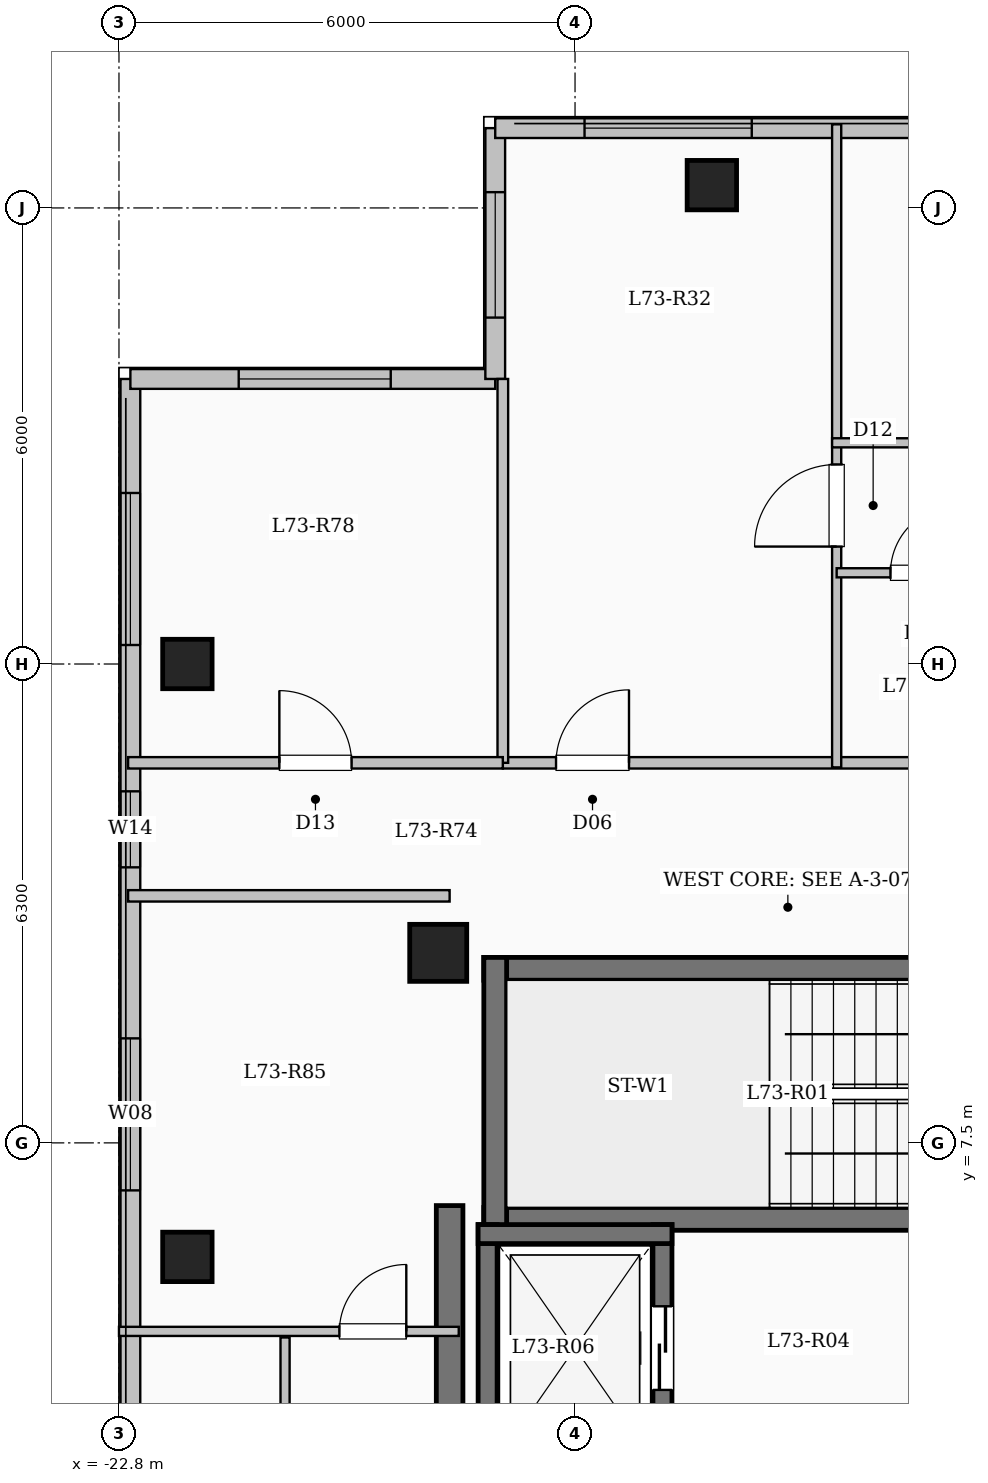
"""IFC4 building model, lengths in metres.
Left out: names, types, materials, properties, quantities, classifications, styles, units other than length and angle.
Written with IfcOpenShell. Run it as: python <this file> out.ifc"""

import sys

from ifc_helpers import new_model, si_unit, direction, frame, frame_2d, origin, origin_2d, place, context, subcontext, project, spatial, rectangle, extrude, element, fill, save


model = new_model("IFC4")
c1 = context("Model", 3, precision=1e-05, world=origin(), true_north=direction((0.0, 1.0)))
c2 = subcontext(c1, "Body", "Model", "MODEL_VIEW")
j1 = project(units=[si_unit("LENGTHUNIT", "METRE"), si_unit("PLANEANGLEUNIT", "RADIAN")], contexts=[c1])
p1 = place(None, origin())
s1 = spatial("IfcSite", under=j1, at=p1, CompositionType="ELEMENT")
p2 = place(p1, origin())
s2 = spatial("IfcBuilding", under=s1, at=p2, CompositionType="ELEMENT")
p3 = place(p2, frame((0.0, 0.0, 268.3)))
s3 = spatial("IfcBuildingStorey", under=s2, at=p3, CompositionType="ELEMENT", Elevation=268.3)
p4 = place(p3, frame((-18.6, 10.0, 0.0), z_axis=(0.0, 0.0, 1.0), x_axis=(1.0, 0.0, 0.0)))
e1 = element("IfcColumn", 1, at=p4, inside=s3, PredefinedType="COLUMN", context=c2, shape_type="SweptSolid", body=[
    extrude(rectangle(XDim=0.75, YDim=0.75, at=origin_2d()), origin(), (0.0, 0.0, 1.0), 3.35),
])
for number, where, z_axis, x_axis in (
    (2, (-15.0, 20.1, 0.0), (0.0, 0.0, 1.0), (1.0, 0.0, 0.0)),
    (3, (-21.9, 6.0, 0.0), (0.0, 0.0, 1.0), (1.0, 0.0, 0.0)),
    (4, (-21.9, 13.8, 0.0), (0.0, 0.0, 1.0), (1.0, 0.0, 0.0)),
):
    element("IfcColumn", number, at=place(p3, frame(where, z_axis=z_axis, x_axis=x_axis)), inside=s3, PredefinedType="COLUMN", context=c2, shape_type="SweptSolid", body=[
        extrude(rectangle(XDim=0.65, YDim=0.65, at=origin_2d()), origin(), (0.0, 0.0, 1.0), 3.35),
    ])
p5 = place(p3, frame((-22.65, -17.55, 0.0), z_axis=(0.0, 0.0, 1.0), x_axis=(0.0, 1.0, 0.0)))
e5 = element("IfcWall", 5, at=p5, inside=s3, PredefinedType="SOLIDWALL", context=c2, shape_type="SweptSolid", body=[
    extrude(rectangle(XDim=35.1, YDim=0.26, at=frame_2d((17.55, 0.0))), origin(), (0.0, 0.0, 1.0), 3.05),
])
p6 = place(p5, frame((2.975, 0.0, 0.9)))
e6 = element("IfcOpeningElement", 6, at=p6, cuts=e5, PredefinedType="OPENING", context=c2, shape_type="SweptSolid", body=[
    extrude(rectangle(XDim=2.2, YDim=1.75, at=frame_2d((1.1, 0.875))), frame((0.0, 0.14, 0.0), z_axis=(0.0, -1.0, 0.0), x_axis=(1.0, 0.0, 0.0)), (0.0, 0.0, 1.0), 0.28),
])
p7 = place(p5, frame((8.625, 0.0, 0.95)))
e7 = element("IfcOpeningElement", 7, at=p7, cuts=e5, PredefinedType="OPENING", context=c2, shape_type="SweptSolid", body=[
    extrude(rectangle(XDim=1.2, YDim=1.5, at=frame_2d((0.6, 0.75))), frame((0.0, 0.14, 0.0), z_axis=(0.0, -1.0, 0.0), x_axis=(1.0, 0.0, 0.0)), (0.0, 0.0, 1.0), 0.28),
])
p8 = place(p5, frame((13.55, 0.0, 0.9)))
e8 = element("IfcOpeningElement", 8, at=p8, cuts=e5, PredefinedType="OPENING", context=c2, shape_type="SweptSolid", body=[
    extrude(rectangle(XDim=2.2, YDim=1.75, at=frame_2d((1.1, 0.875))), frame((0.0, 0.14, 0.0), z_axis=(0.0, -1.0, 0.0), x_axis=(1.0, 0.0, 0.0)), (0.0, 0.0, 1.0), 0.28),
])
p9 = place(p5, frame((19.95, 0.0, 0.9)))
e9 = element("IfcOpeningElement", 9, at=p9, cuts=e5, PredefinedType="OPENING", context=c2, shape_type="SweptSolid", body=[
    extrude(rectangle(XDim=1.65, YDim=1.6, at=frame_2d((0.825, 0.8))), frame((0.0, 0.14, 0.0), z_axis=(0.0, -1.0, 0.0), x_axis=(1.0, 0.0, 0.0)), (0.0, 0.0, 1.0), 0.28),
])
p10 = place(p5, frame((24.425, 0.0, 0.9)))
e10 = element("IfcOpeningElement", 10, at=p10, cuts=e5, PredefinedType="OPENING", context=c2, shape_type="SweptSolid", body=[
    extrude(rectangle(XDim=2.0, YDim=1.7, at=frame_2d((1.0, 0.85))), frame((0.0, 0.14, 0.0), z_axis=(0.0, -1.0, 0.0), x_axis=(1.0, 0.0, 0.0)), (0.0, 0.0, 1.0), 0.28),
])
p11 = place(p5, frame((28.675, 0.0, 0.95)))
e11 = element("IfcOpeningElement", 11, at=p11, cuts=e5, PredefinedType="OPENING", context=c2, shape_type="SweptSolid", body=[
    extrude(rectangle(XDim=1.0, YDim=1.5, at=frame_2d((0.5, 0.75))), frame((0.0, 0.14, 0.0), z_axis=(0.0, -1.0, 0.0), x_axis=(1.0, 0.0, 0.0)), (0.0, 0.0, 1.0), 0.28),
])
p12 = place(p5, frame((31.6, 0.0, 0.9)))
e12 = element("IfcOpeningElement", 12, at=p12, cuts=e5, PredefinedType="OPENING", context=c2, shape_type="SweptSolid", body=[
    extrude(rectangle(XDim=2.0, YDim=1.7, at=frame_2d((1.0, 0.85))), frame((0.0, 0.14, 0.0), z_axis=(0.0, -1.0, 0.0), x_axis=(1.0, 0.0, 0.0)), (0.0, 0.0, 1.0), 0.28),
])
p13 = place(p3, frame((-22.65, 17.55, 0.0), z_axis=(0.0, 0.0, 1.0), x_axis=(1.0, 0.0, 0.0)))
e13 = element("IfcWall", 13, at=p13, inside=s3, PredefinedType="SOLIDWALL", context=c2, shape_type="SweptSolid", body=[
    extrude(rectangle(XDim=4.8, YDim=0.26, at=frame_2d((2.4, 0.0))), origin(), (0.0, 0.0, 1.0), 3.05),
])
p14 = place(p13, frame((1.425, 0.0, 0.9)))
e14 = element("IfcOpeningElement", 14, at=p14, cuts=e13, PredefinedType="OPENING", context=c2, shape_type="SweptSolid", body=[
    extrude(rectangle(XDim=2.0, YDim=1.7, at=frame_2d((1.0, 0.85))), frame((0.0, 0.14, 0.0), z_axis=(0.0, -1.0, 0.0), x_axis=(1.0, 0.0, 0.0)), (0.0, 0.0, 1.0), 0.28),
])
p15 = place(p3, frame((-17.85, 17.55, 0.0), z_axis=(0.0, 0.0, 1.0), x_axis=(0.0, 1.0, 0.0)))
e15 = element("IfcWall", 15, at=p15, inside=s3, PredefinedType="SOLIDWALL", context=c2, shape_type="SweptSolid", body=[
    extrude(rectangle(XDim=3.3, YDim=0.26, at=frame_2d((1.65, 0.0))), origin(), (0.0, 0.0, 1.0), 3.05),
])
p16 = place(p15, frame((0.808, 0.0, 0.9)))
e16 = element("IfcOpeningElement", 16, at=p16, cuts=e15, PredefinedType="OPENING", context=c2, shape_type="SweptSolid", body=[
    extrude(rectangle(XDim=1.65, YDim=1.6, at=frame_2d((0.825, 0.8))), frame((0.0, 0.14, 0.0), z_axis=(0.0, -1.0, 0.0), x_axis=(1.0, 0.0, 0.0)), (0.0, 0.0, 1.0), 0.28),
])
p17 = place(p3, frame((-17.85, 20.85, 0.0), z_axis=(0.0, 0.0, 1.0), x_axis=(1.0, 0.0, 0.0)))
e17 = element("IfcWall", 17, at=p17, inside=s3, PredefinedType="SOLIDWALL", context=c2, shape_type="SweptSolid", body=[
    extrude(rectangle(XDim=10.5, YDim=0.26, at=frame_2d((5.25, 0.0))), origin(), (0.0, 0.0, 1.0), 3.05),
])
p18 = place(p17, frame((1.175, 0.0, 0.9)))
e18 = element("IfcOpeningElement", 18, at=p18, cuts=e17, PredefinedType="OPENING", context=c2, shape_type="SweptSolid", body=[
    extrude(rectangle(XDim=2.2, YDim=1.75, at=frame_2d((1.1, 0.875))), frame((0.0, 0.14, 0.0), z_axis=(0.0, -1.0, 0.0), x_axis=(1.0, 0.0, 0.0)), (0.0, 0.0, 1.0), 0.28),
])
p19 = place(p17, frame((5.85, 0.0, 0.9)))
e19 = element("IfcOpeningElement", 19, at=p19, cuts=e17, PredefinedType="OPENING", context=c2, shape_type="SweptSolid", body=[
    extrude(rectangle(XDim=1.65, YDim=1.6, at=frame_2d((0.825, 0.8))), frame((0.0, 0.14, 0.0), z_axis=(0.0, -1.0, 0.0), x_axis=(1.0, 0.0, 0.0)), (0.0, 0.0, 1.0), 0.28),
])
p20 = place(p17, frame((9.292, 0.0, 0.95)))
e20 = element("IfcOpeningElement", 20, at=p20, cuts=e17, PredefinedType="OPENING", context=c2, shape_type="SweptSolid", body=[
    extrude(rectangle(XDim=1.0, YDim=1.5, at=frame_2d((0.5, 0.75))), frame((0.0, 0.14, 0.0), z_axis=(0.0, -1.0, 0.0), x_axis=(1.0, 0.0, 0.0)), (0.0, 0.0, 1.0), 0.28),
])
p21 = place(p3, frame((-18.0, 9.79, 0.0), z_axis=(0.0, 0.0, 1.0), x_axis=(1.0, 0.0, 0.0)))
e21 = element("IfcWall", 21, at=p21, inside=s3, PredefinedType="SHEAR", context=c2, shape_type="SweptSolid", body=[
    extrude(rectangle(XDim=8.0, YDim=0.3, at=frame_2d((4.0, 0.0))), origin(), (0.0, 0.0, 1.0), 3.35),
])
p22 = place(p3, frame((-18.0, 6.5, 0.0), z_axis=(0.0, 0.0, 1.0), x_axis=(1.0, 0.0, 0.0)))
e22 = element("IfcWall", 22, at=p22, inside=s3, PredefinedType="SHEAR", context=c2, shape_type="SweptSolid", body=[
    extrude(rectangle(XDim=8.0, YDim=0.3, at=frame_2d((4.0, 0.0))), origin(), (0.0, 0.0, 1.0), 3.35),
])
p23 = place(p22, frame((6.45, 0.0, 0.0)))
e23 = element("IfcOpeningElement", 23, at=p23, cuts=e22, PredefinedType="OPENING", context=c2, shape_type="SweptSolid", body=[
    extrude(rectangle(XDim=1.0, YDim=2.15, at=frame_2d((0.5, 1.075))), frame((0.0, 0.16, 0.0), z_axis=(0.0, -1.0, 0.0), x_axis=(1.0, 0.0, 0.0)), (0.0, 0.0, 1.0), 0.32),
])
p24 = place(p3, frame((-17.85, 6.35, 0.0), z_axis=(0.0, 0.0, 1.0), x_axis=(0.0, 1.0, 0.0)))
e24 = element("IfcWall", 24, at=p24, inside=s3, PredefinedType="SHEAR", context=c2, shape_type="SweptSolid", body=[
    extrude(rectangle(XDim=3.59, YDim=0.3, at=frame_2d((1.795, 0.0))), origin(), (0.0, 0.0, 1.0), 3.35),
])
p25 = place(p3, frame((-17.95, 3.175, 0.0), z_axis=(0.0, 0.0, 1.0), x_axis=(0.0, 1.0, 0.0)))
e25 = element("IfcWall", 25, at=p25, inside=s3, PredefinedType="SHEAR", context=c2, shape_type="SweptSolid", body=[
    extrude(rectangle(XDim=3.25, YDim=0.25, at=frame_2d((1.625, 0.0))), origin(), (0.0, 0.0, 1.0), 3.35),
])
p26 = place(p3, frame((-15.65, 3.175, 0.0), z_axis=(0.0, 0.0, 1.0), x_axis=(0.0, 1.0, 0.0)))
e26 = element("IfcWall", 26, at=p26, inside=s3, PredefinedType="SHEAR", context=c2, shape_type="SweptSolid", body=[
    extrude(rectangle(XDim=3.25, YDim=0.25, at=frame_2d((1.625, 0.0))), origin(), (0.0, 0.0, 1.0), 3.35),
])
p27 = place(p26, frame((1.075, 0.0, 0.0)))
e27 = element("IfcOpeningElement", 27, at=p27, cuts=e26, PredefinedType="OPENING", context=c2, shape_type="SweptSolid", body=[
    extrude(rectangle(XDim=1.1, YDim=2.15, at=frame_2d((0.55, 1.075))), frame((0.0, 0.135, 0.0), z_axis=(0.0, -1.0, 0.0), x_axis=(1.0, 0.0, 0.0)), (0.0, 0.0, 1.0), 0.27),
])
p28 = place(p3, frame((-18.075, 6.3, 0.0), z_axis=(0.0, 0.0, 1.0), x_axis=(1.0, 0.0, 0.0)))
e28 = element("IfcWall", 28, at=p28, inside=s3, PredefinedType="SHEAR", context=c2, shape_type="SweptSolid", body=[
    extrude(rectangle(XDim=2.55, YDim=0.25, at=frame_2d((1.275, 0.0))), origin(), (0.0, 0.0, 1.0), 3.35),
])
p29 = place(p3, frame((-18.45, -7.375, 0.0), z_axis=(0.0, 0.0, 1.0), x_axis=(0.0, 1.0, 0.0)))
e29 = element("IfcWall", 29, at=p29, inside=s3, PredefinedType="SHEAR", context=c2, shape_type="SweptSolid", body=[
    extrude(rectangle(XDim=14.05, YDim=0.35, at=frame_2d((7.025, 0.0))), origin(), (0.0, 0.0, 1.0), 3.35),
])
p30 = place(p3, frame((-17.75, 12.5, 0.0), z_axis=(0.0, 0.0, 1.0), x_axis=(1.0, 0.0, 0.0)))
e30 = element("IfcWall", 30, at=p30, inside=s3, PredefinedType="PARTITIONING", context=c2, shape_type="SweptSolid", body=[
    extrude(rectangle(XDim=13.9, YDim=0.15, at=frame_2d((6.95, 0.0))), origin(), (0.0, 0.0, 1.0), 3.05),
])
p31 = place(p30, frame((0.7, 0.0, 0.0)))
e31 = element("IfcOpeningElement", 31, at=p31, cuts=e30, PredefinedType="OPENING", context=c2, shape_type="SweptSolid", body=[
    extrude(rectangle(XDim=0.96, YDim=2.15, at=frame_2d((0.48, 1.075))), frame((0.0, 0.085, 0.0), z_axis=(0.0, -1.0, 0.0), x_axis=(1.0, 0.0, 0.0)), (0.0, 0.0, 1.0), 0.17),
])
p32 = place(p30, frame((9.484, 0.0, 0.0)))
e32 = element("IfcOpeningElement", 32, at=p32, cuts=e30, PredefinedType="OPENING", context=c2, shape_type="SweptSolid", body=[
    extrude(rectangle(XDim=0.96, YDim=2.15, at=frame_2d((0.48, 1.075))), frame((0.0, 0.085, 0.0), z_axis=(0.0, -1.0, 0.0), x_axis=(1.0, 0.0, 0.0)), (0.0, 0.0, 1.0), 0.17),
])
p33 = place(p3, frame((-13.358, 12.44, 0.0), z_axis=(0.0, 0.0, 1.0), x_axis=(0.0, 1.0, 0.0)))
e33 = element("IfcWall", 33, at=p33, inside=s3, PredefinedType="PARTITIONING", context=c2, shape_type="SweptSolid", body=[
    extrude(rectangle(XDim=8.46, YDim=0.12, at=frame_2d((4.23, 0.0))), origin(), (0.0, 0.0, 1.0), 3.05),
])
p34 = place(p33, frame((2.905, 0.0, 0.0)))
e34 = element("IfcOpeningElement", 34, at=p34, cuts=e33, PredefinedType="OPENING", context=c2, shape_type="SweptSolid", body=[
    extrude(rectangle(XDim=1.08, YDim=2.15, at=frame_2d((0.54, 1.075))), frame((0.0, 0.07, 0.0), z_axis=(0.0, -1.0, 0.0), x_axis=(1.0, 0.0, 0.0)), (0.0, 0.0, 1.0), 0.14),
])
p35 = place(p3, frame((-13.358, 15.0, 0.0), z_axis=(0.0, 0.0, 1.0), x_axis=(1.0, 0.0, 0.0)))
e35 = element("IfcWall", 35, at=p35, inside=s3, PredefinedType="PARTITIONING", context=c2, shape_type="SweptSolid", body=[
    extrude(rectangle(XDim=2.296, YDim=0.12, at=frame_2d((1.148, 0.0))), origin(), (0.0, 0.0, 1.0), 3.05),
])
p36 = place(p35, frame((0.708, 0.0, 0.0)))
e36 = element("IfcOpeningElement", 36, at=p36, cuts=e35, PredefinedType="OPENING", context=c2, shape_type="SweptSolid", body=[
    extrude(rectangle(XDim=0.88, YDim=2.1, at=frame_2d((0.44, 1.05))), frame((0.0, 0.07, 0.0), z_axis=(0.0, -1.0, 0.0), x_axis=(1.0, 0.0, 0.0)), (0.0, 0.0, 1.0), 0.14),
])
p37 = place(p3, frame((-13.418, 16.71, 0.0), z_axis=(0.0, 0.0, 1.0), x_axis=(1.0, 0.0, 0.0)))
e37 = element("IfcWall", 37, at=p37, inside=s3, PredefinedType="PARTITIONING", context=c2, shape_type="SweptSolid", body=[
    extrude(rectangle(XDim=4.512, YDim=0.12, at=frame_2d((2.256, 0.0))), origin(), (0.0, 0.0, 1.0), 2.735),
])
p38 = place(p37, frame((1.726, 0.0, 0.0)))
e38 = element("IfcOpeningElement", 38, at=p38, cuts=e37, PredefinedType="OPENING", context=c2, shape_type="SweptSolid", body=[
    extrude(rectangle(XDim=0.88, YDim=2.1, at=frame_2d((0.44, 1.05))), frame((0.0, 0.07, 0.0), z_axis=(0.0, -1.0, 0.0), x_axis=(1.0, 0.0, 0.0)), (0.0, 0.0, 1.0), 0.14),
])
p39 = place(p3, frame((-22.68, 10.75, 0.0), z_axis=(0.0, 0.0, 1.0), x_axis=(1.0, 0.0, 0.0)))
e39 = element("IfcWall", 39, at=p39, inside=s3, PredefinedType="PARTITIONING", context=c2, shape_type="SweptSolid", body=[
    extrude(rectangle(XDim=4.23, YDim=0.15, at=frame_2d((2.115, 0.0))), origin(), (0.0, 0.0, 1.0), 3.05),
])
p40 = place(p3, frame((-17.75, 12.5, 0.0), z_axis=(0.0, 0.0, 1.0), x_axis=(0.0, 1.0, 0.0)))
e40 = element("IfcWall", 40, at=p40, inside=s3, PredefinedType="PARTITIONING", context=c2, shape_type="SweptSolid", body=[
    extrude(rectangle(XDim=5.05, YDim=0.14, at=frame_2d((2.525, 0.0))), origin(), (0.0, 0.0, 1.0), 3.05),
])
p41 = place(p3, frame((-22.68, 12.5, 0.0), z_axis=(0.0, 0.0, 1.0), x_axis=(1.0, 0.0, 0.0)))
e41 = element("IfcWall", 41, at=p41, inside=s3, PredefinedType="PARTITIONING", context=c2, shape_type="SweptSolid", body=[
    extrude(rectangle(XDim=4.93, YDim=0.15, at=frame_2d((2.465, 0.0))), origin(), (0.0, 0.0, 1.0), 3.05),
])
p42 = place(p41, frame((1.99, 0.0, 0.0)))
e42 = element("IfcOpeningElement", 42, at=p42, cuts=e41, PredefinedType="OPENING", context=c2, shape_type="SweptSolid", body=[
    extrude(rectangle(XDim=0.95, YDim=2.15, at=frame_2d((0.475, 1.075))), frame((0.0, 0.085, 0.0), z_axis=(0.0, -1.0, 0.0), x_axis=(1.0, 0.0, 0.0)), (0.0, 0.0, 1.0), 0.17),
])
p43 = place(p3, frame((-22.8, 5.02, 0.0), z_axis=(0.0, 0.0, 1.0), x_axis=(1.0, 0.0, 0.0)))
e43 = element("IfcWall", 43, at=p43, inside=s3, PredefinedType="PARTITIONING", context=c2, shape_type="SweptSolid", body=[
    extrude(rectangle(XDim=4.47, YDim=0.12, at=frame_2d((2.235, 0.0))), origin(), (0.0, 0.0, 1.0), 3.05),
])
p44 = place(p43, frame((2.9, 0.0, 0.0)))
e44 = element("IfcOpeningElement", 44, at=p44, cuts=e43, PredefinedType="OPENING", context=c2, shape_type="SweptSolid", body=[
    extrude(rectangle(XDim=0.88, YDim=2.1, at=frame_2d((0.44, 1.05))), frame((0.0, 0.07, 0.0), z_axis=(0.0, -1.0, 0.0), x_axis=(1.0, 0.0, 0.0)), (0.0, 0.0, 1.0), 0.14),
])
p45 = place(p3, frame((-20.615, 1.36, 0.0), z_axis=(0.0, 0.0, 1.0), x_axis=(0.0, 1.0, 0.0)))
e45 = element("IfcWall", 45, at=p45, inside=s3, PredefinedType="PARTITIONING", context=c2, shape_type="SweptSolid", body=[
    extrude(rectangle(XDim=3.58, YDim=0.12, at=frame_2d((1.79, 0.0))), origin(), (0.0, 0.0, 1.0), 3.05),
])
p46 = place(p10, origin())
e46 = element("IfcWindow", 46, at=p46, inside=s3, PartitioningType="SINGLE_PANEL", PredefinedType="WINDOW", context=c2, shape_type="SweptSolid", body=[
    extrude(rectangle(XDim=2.0, YDim=1.7, at=frame_2d((1.0, 0.85))), frame((0.0, 0.03, 0.0), z_axis=(0.0, -1.0, 0.0), x_axis=(1.0, 0.0, 0.0)), (0.0, 0.0, 1.0), 0.06),
])
fill(e10, e46)
p47 = place(p11, origin())
e47 = element("IfcWindow", 47, at=p47, inside=s3, PartitioningType="SINGLE_PANEL", PredefinedType="WINDOW", context=c2, shape_type="SweptSolid", body=[
    extrude(rectangle(XDim=1.0, YDim=1.5, at=frame_2d((0.5, 0.75))), frame((0.0, 0.03, 0.0), z_axis=(0.0, -1.0, 0.0), x_axis=(1.0, 0.0, 0.0)), (0.0, 0.0, 1.0), 0.06),
])
fill(e11, e47)
p48 = place(p12, origin())
e48 = element("IfcWindow", 48, at=p48, inside=s3, PartitioningType="SINGLE_PANEL", PredefinedType="WINDOW", context=c2, shape_type="SweptSolid", body=[
    extrude(rectangle(XDim=2.0, YDim=1.7, at=frame_2d((1.0, 0.85))), frame((0.0, 0.03, 0.0), z_axis=(0.0, -1.0, 0.0), x_axis=(1.0, 0.0, 0.0)), (0.0, 0.0, 1.0), 0.06),
])
fill(e12, e48)
p49 = place(p14, origin())
e49 = element("IfcWindow", 49, at=p49, inside=s3, PartitioningType="SINGLE_PANEL", PredefinedType="WINDOW", context=c2, shape_type="SweptSolid", body=[
    extrude(rectangle(XDim=2.0, YDim=1.7, at=frame_2d((1.0, 0.85))), frame((0.0, 0.03, 0.0), z_axis=(0.0, -1.0, 0.0), x_axis=(1.0, 0.0, 0.0)), (0.0, 0.0, 1.0), 0.06),
])
fill(e14, e49)
p50 = place(p16, origin())
e50 = element("IfcWindow", 50, at=p50, inside=s3, PartitioningType="SINGLE_PANEL", PredefinedType="WINDOW", context=c2, shape_type="SweptSolid", body=[
    extrude(rectangle(XDim=1.65, YDim=1.6, at=frame_2d((0.825, 0.8))), frame((0.0, 0.03, 0.0), z_axis=(0.0, -1.0, 0.0), x_axis=(1.0, 0.0, 0.0)), (0.0, 0.0, 1.0), 0.06),
])
fill(e16, e50)
p51 = place(p18, origin())
e51 = element("IfcWindow", 51, at=p51, inside=s3, PartitioningType="SINGLE_PANEL", PredefinedType="WINDOW", context=c2, shape_type="SweptSolid", body=[
    extrude(rectangle(XDim=2.2, YDim=1.75, at=frame_2d((1.1, 0.875))), frame((0.0, 0.03, 0.0), z_axis=(0.0, -1.0, 0.0), x_axis=(1.0, 0.0, 0.0)), (0.0, 0.0, 1.0), 0.06),
])
fill(e18, e51)
p52 = place(p27, origin())
e52 = element("IfcDoor", 52, at=p52, inside=s3, OperationType="SLIDING_TO_LEFT", PredefinedType="DOOR", context=c2, shape_type="SweptSolid", body=[
    extrude(rectangle(XDim=1.1, YDim=2.15, at=frame_2d((0.55, 1.075))), frame((0.0, 0.025, 0.0), z_axis=(0.0, -1.0, 0.0), x_axis=(1.0, 0.0, 0.0)), (0.0, 0.0, 1.0), 0.05),
])
fill(e27, e52)
p53 = place(p31, origin())
e53 = element("IfcDoor", 53, at=p53, inside=s3, OperationType="SINGLE_SWING_RIGHT", PredefinedType="DOOR", context=c2, shape_type="SweptSolid", body=[
    extrude(rectangle(XDim=0.96, YDim=2.15, at=frame_2d((0.48, 1.075))), frame((0.0, 0.025, 0.0), z_axis=(0.0, -1.0, 0.0), x_axis=(1.0, 0.0, 0.0)), (0.0, 0.0, 1.0), 0.05),
])
fill(e31, e53)
p54 = place(p34, origin())
e54 = element("IfcDoor", 54, at=p54, inside=s3, OperationType="SINGLE_SWING_LEFT", PredefinedType="DOOR", context=c2, shape_type="SweptSolid", body=[
    extrude(rectangle(XDim=1.08, YDim=2.15, at=frame_2d((0.54, 1.075))), frame((0.0, 0.025, 0.0), z_axis=(0.0, -1.0, 0.0), x_axis=(1.0, 0.0, 0.0)), (0.0, 0.0, 1.0), 0.05),
])
fill(e34, e54)
p55 = place(p36, origin())
e55 = element("IfcDoor", 55, at=p55, inside=s3, OperationType="SINGLE_SWING_RIGHT", PredefinedType="DOOR", context=c2, shape_type="SweptSolid", body=[
    extrude(rectangle(XDim=0.88, YDim=2.1, at=frame_2d((0.44, 1.05))), frame((0.0, 0.025, 0.0), z_axis=(0.0, -1.0, 0.0), x_axis=(1.0, 0.0, 0.0)), (0.0, 0.0, 1.0), 0.05),
])
fill(e36, e55)
p56 = place(p42, origin())
e56 = element("IfcDoor", 56, at=p56, inside=s3, OperationType="SINGLE_SWING_LEFT", PredefinedType="DOOR", context=c2, shape_type="SweptSolid", body=[
    extrude(rectangle(XDim=0.95, YDim=2.15, at=frame_2d((0.475, 1.075))), frame((0.0, 0.025, 0.0), z_axis=(0.0, -1.0, 0.0), x_axis=(1.0, 0.0, 0.0)), (0.0, 0.0, 1.0), 0.05),
])
fill(e42, e56)
p57 = place(p44, origin())
e57 = element("IfcDoor", 57, at=p57, inside=s3, OperationType="SINGLE_SWING_RIGHT", PredefinedType="DOOR", context=c2, shape_type="SweptSolid", body=[
    extrude(rectangle(XDim=0.88, YDim=2.1, at=frame_2d((0.44, 1.05))), frame((0.0, 0.025, 0.0), z_axis=(0.0, -1.0, 0.0), x_axis=(1.0, 0.0, 0.0)), (0.0, 0.0, 1.0), 0.05),
])
fill(e44, e57)
save(model, sys.argv[1])
